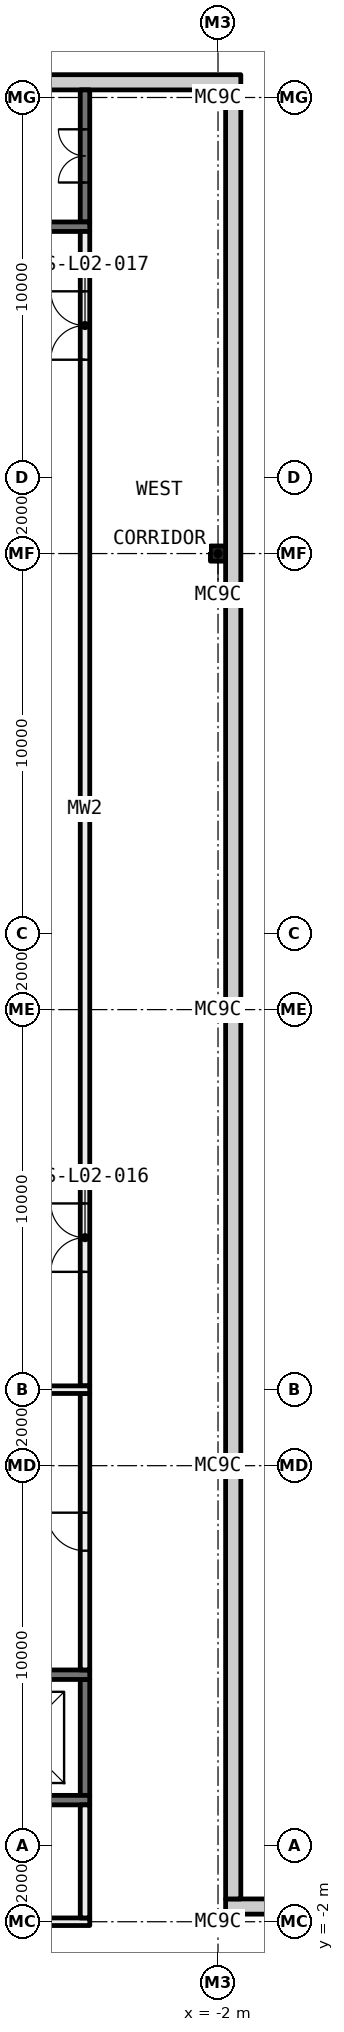
"""IFC4 building model, lengths in metres.
Left out: names, types, materials, properties, quantities, classifications, styles, units other than length and angle.
Written with IfcOpenShell. Run it as: python <this file> out.ifc"""

import sys

from ifc_helpers import new_model, si_unit, direction, frame, frame_2d, origin, origin_2d, place, context, subcontext, project, spatial, rectangle, i_section, extrude, element, fill, save


model = new_model("IFC4")
c1 = context("Model", 3, precision=1e-05, world=origin(), true_north=direction((0.0, 1.0)))
c2 = subcontext(c1, "Body", "Model", "MODEL_VIEW")
j1 = project(units=[si_unit("LENGTHUNIT", "METRE"), si_unit("PLANEANGLEUNIT", "RADIAN")], contexts=[c1])
p1 = place(None, origin())
s1 = spatial("IfcSite", under=j1, at=p1, CompositionType="ELEMENT")
p2 = place(p1, origin())
s2 = spatial("IfcBuilding", under=s1, at=p2, CompositionType="ELEMENT")
p3 = place(p2, frame((0.0, 0.0, 12.0)))
s3 = spatial("IfcBuildingStorey", under=s2, at=p3, CompositionType="ELEMENT", Elevation=12.0)
for number, where, z_axis, x_axis in (
    (1, (-2.0, -2.0, 0.0), (0.0, 0.0, 1.0), (1.0, 0.0, 0.0)),
    (2, (-2.0, 10.0, 0.0), (0.0, 0.0, 1.0), (1.0, 0.0, 0.0)),
    (3, (-2.0, 22.0, 0.0), (0.0, 0.0, 1.0), (1.0, 0.0, 0.0)),
    (4, (-2.0, 34.0, 0.0), (0.0, 0.0, 1.0), (1.0, 0.0, 0.0)),
    (5, (-2.0, 46.0, 0.0), (0.0, 0.0, 1.0), (1.0, 0.0, 0.0)),
):
    element("IfcColumn", number, at=place(p3, frame(where, z_axis=z_axis, x_axis=x_axis)), inside=s3, PredefinedType="COLUMN", context=c2, shape_type="SweptSolid", body=[
        extrude(i_section(OverallWidth=0.4, OverallDepth=0.4, WebThickness=0.013, FlangeThickness=0.021, FilletRadius=0.022, at=origin_2d()), origin(), (0.0, 0.0, 1.0), 5.6),
    ])
p4 = place(p3, frame((-5.5, 12.1, 0.0), z_axis=(0.0, 0.0, 1.0), x_axis=(0.0, 1.0, 0.0)))
e6 = element("IfcWall", 6, at=p4, inside=s3, PredefinedType="PARTITIONING", context=c2, shape_type="SweptSolid", body=[
    extrude(rectangle(XDim=30.375, YDim=0.25, at=frame_2d((15.188, 0.0))), origin(), (0.0, 0.0, 1.0), 5.6),
])
p5 = place(p4, frame((3.0, 0.0, 0.0)))
e7 = element("IfcOpeningElement", 7, at=p5, cuts=e6, PredefinedType="OPENING", context=c2, shape_type="SweptSolid", body=[
    extrude(rectangle(XDim=1.8, YDim=2.1, at=frame_2d((0.9, 1.05))), frame((0.0, 0.135, 0.0), z_axis=(0.0, -1.0, 0.0), x_axis=(1.0, 0.0, 0.0)), (0.0, 0.0, 1.0), 0.27),
])
p6 = place(p4, frame((27.0, 0.0, 0.0)))
e8 = element("IfcOpeningElement", 8, at=p6, cuts=e6, PredefinedType="OPENING", context=c2, shape_type="SweptSolid", body=[
    extrude(rectangle(XDim=1.8, YDim=2.1, at=frame_2d((0.9, 1.05))), frame((0.0, 0.135, 0.0), z_axis=(0.0, -1.0, 0.0), x_axis=(1.0, 0.0, 0.0)), (0.0, 0.0, 1.0), 0.27),
])
p7 = place(p3, frame((-12.375, -2.0, 0.0), z_axis=(0.0, 0.0, 1.0), x_axis=(1.0, 0.0, 0.0)))
e9 = element("IfcWall", 9, at=p7, inside=s3, PredefinedType="PARTITIONING", context=c2, shape_type="SweptSolid", body=[
    extrude(rectangle(XDim=7.0, YDim=0.2, at=frame_2d((3.5, 0.0))), origin(), (0.0, 0.0, 1.0), 5.012),
])
p8 = place(p7, frame((2.6, 0.0, 0.0)))
e10 = element("IfcOpeningElement", 10, at=p8, cuts=e9, PredefinedType="OPENING", context=c2, shape_type="SweptSolid", body=[
    extrude(rectangle(XDim=1.8, YDim=2.1, at=frame_2d((0.9, 1.05))), frame((0.0, 0.11, 0.0), z_axis=(0.0, -1.0, 0.0), x_axis=(1.0, 0.0, 0.0)), (0.0, 0.0, 1.0), 0.22),
])
p9 = place(p3, frame((-5.5, -1.9, 0.0), z_axis=(0.0, 0.0, 1.0), x_axis=(0.0, 1.0, 0.0)))
e11 = element("IfcWall", 11, at=p9, inside=s3, PredefinedType="PARTITIONING", context=c2, shape_type="SweptSolid", body=[
    extrude(rectangle(XDim=2.975, YDim=0.25, at=frame_2d((1.487, 0.0))), origin(), (0.0, 0.0, 1.0), 5.6),
])
p10 = place(p3, frame((-5.5, 1.325, 0.0), z_axis=(0.0, 0.0, 1.0), x_axis=(0.0, 1.0, 0.0)))
e12 = element("IfcWall", 12, at=p10, inside=s3, PredefinedType="SHEAR", context=c2, shape_type="SweptSolid", body=[
    extrude(rectangle(XDim=3.05, YDim=0.25, at=frame_2d((1.525, 0.0))), origin(), (0.0, 0.0, 1.0), 5.6),
])
p11 = place(p3, frame((-5.5, 42.725, 0.0), z_axis=(0.0, 0.0, 1.0), x_axis=(0.0, 1.0, 0.0)))
e13 = element("IfcWall", 13, at=p11, inside=s3, PredefinedType="SHEAR", context=c2, shape_type="SweptSolid", body=[
    extrude(rectangle(XDim=3.475, YDim=0.25, at=frame_2d((1.737, 0.0))), origin(), (0.0, 0.0, 1.0), 5.6),
])
p12 = place(p11, frame((1.038, 0.0, 0.0)))
e14 = element("IfcOpeningElement", 14, at=p12, cuts=e13, PredefinedType="OPENING", context=c2, shape_type="SweptSolid", body=[
    extrude(rectangle(XDim=1.4, YDim=2.1, at=frame_2d((0.7, 1.05))), frame((0.0, 0.135, 0.0), z_axis=(0.0, -1.0, 0.0), x_axis=(1.0, 0.0, 0.0)), (0.0, 0.0, 1.0), 0.27),
])
p13 = place(p3, frame((-5.5, 4.625, 0.0), z_axis=(0.0, 0.0, 1.0), x_axis=(0.0, 1.0, 0.0)))
e15 = element("IfcWall", 15, at=p13, inside=s3, PredefinedType="PARTITIONING", context=c2, shape_type="SweptSolid", body=[
    extrude(rectangle(XDim=7.275, YDim=0.25, at=frame_2d((3.637, 0.0))), origin(), (0.0, 0.0, 1.0), 5.6),
])
p14 = place(p13, frame((3.138, 0.0, 0.0)))
e16 = element("IfcOpeningElement", 16, at=p14, cuts=e15, PredefinedType="OPENING", context=c2, shape_type="SweptSolid", body=[
    extrude(rectangle(XDim=1.0, YDim=2.1, at=frame_2d((0.5, 1.05))), frame((0.0, 0.135, 0.0), z_axis=(0.0, -1.0, 0.0), x_axis=(1.0, 0.0, 0.0)), (0.0, 0.0, 1.0), 0.27),
])
p15 = place(p3, frame((-8.875, 1.2, 0.0), z_axis=(0.0, 0.0, 1.0), x_axis=(1.0, 0.0, 0.0)))
e17 = element("IfcWall", 17, at=p15, inside=s3, PredefinedType="SHEAR", context=c2, shape_type="SweptSolid", body=[
    extrude(rectangle(XDim=3.5, YDim=0.25, at=frame_2d((1.75, 0.0))), origin(), (0.0, 0.0, 1.0), 5.6),
])
p16 = place(p15, frame((1.075, 0.0, 0.0)))
e18 = element("IfcOpeningElement", 18, at=p16, cuts=e17, PredefinedType="OPENING", context=c2, shape_type="SweptSolid", body=[
    extrude(rectangle(XDim=1.1, YDim=2.1, at=frame_2d((0.55, 1.05))), frame((0.0, 0.135, 0.0), z_axis=(0.0, -1.0, 0.0), x_axis=(1.0, 0.0, 0.0)), (0.0, 0.0, 1.0), 0.27),
])
p17 = place(p3, frame((-8.0, 4.5, 0.0), z_axis=(0.0, 0.0, 1.0), x_axis=(1.0, 0.0, 0.0)))
e19 = element("IfcWall", 19, at=p17, inside=s3, PredefinedType="SHEAR", context=c2, shape_type="SweptSolid", body=[
    extrude(rectangle(XDim=2.625, YDim=0.25, at=frame_2d((1.312, 0.0))), origin(), (0.0, 0.0, 1.0), 5.6),
])
p18 = place(p3, frame((-15.125, 42.6, 0.0), z_axis=(0.0, 0.0, 1.0), x_axis=(1.0, 0.0, 0.0)))
e20 = element("IfcWall", 20, at=p18, inside=s3, PredefinedType="SHEAR", context=c2, shape_type="SweptSolid", body=[
    extrude(rectangle(XDim=9.75, YDim=0.25, at=frame_2d((4.875, 0.0))), origin(), (0.0, 0.0, 1.0), 5.6),
])
p19 = place(p3, frame((-7.8, 12.0, 0.0), z_axis=(0.0, 0.0, 1.0), x_axis=(1.0, 0.0, 0.0)))
e21 = element("IfcWall", 21, at=p19, inside=s3, PredefinedType="PARTITIONING", context=c2, shape_type="SweptSolid", body=[
    extrude(rectangle(XDim=2.425, YDim=0.2, at=frame_2d((1.212, 0.0))), origin(), (0.0, 0.0, 1.0), 5.6),
])
p20 = place(p3, frame((-1.8, -1.6, -0.4), z_axis=(0.0, 0.0, 1.0), x_axis=(1.0, 0.0, 0.0)))
e22 = element("IfcWall", 22, at=p20, inside=s3, PredefinedType="STANDARD", context=c2, shape_type="SweptSolid", body=[
    extrude(rectangle(XDim=12.4, YDim=0.4, at=frame_2d((6.2, 0.0))), origin(), (0.0, 0.0, 1.0), 6.0),
])
p21 = place(p3, frame((-1.6, -1.4, -0.4), z_axis=(0.0, 0.0, 1.0), x_axis=(0.0, 1.0, 0.0)))
e23 = element("IfcWall", 23, at=p21, inside=s3, PredefinedType="STANDARD", context=c2, shape_type="SweptSolid", body=[
    extrude(rectangle(XDim=47.6, YDim=0.4, at=frame_2d((23.8, 0.0))), origin(), (0.0, 0.0, 1.0), 6.0),
])
p22 = place(p3, frame((-26.6, 46.4, -0.4), z_axis=(0.0, 0.0, 1.0), x_axis=(1.0, 0.0, 0.0)))
e24 = element("IfcWall", 24, at=p22, inside=s3, PredefinedType="STANDARD", context=c2, shape_type="SweptSolid", body=[
    extrude(rectangle(XDim=25.2, YDim=0.4, at=frame_2d((12.6, 0.0))), origin(), (0.0, 0.0, 1.0), 6.0),
])
p23 = place(p12, origin())
e25 = element("IfcDoor", 25, at=p23, inside=s3, OperationType="DOUBLE_DOOR_SINGLE_SWING", PredefinedType="DOOR", context=c2, shape_type="SweptSolid", body=[
    extrude(rectangle(XDim=1.4, YDim=2.1, at=frame_2d((0.7, 1.05))), frame((0.0, 0.025, 0.0), z_axis=(0.0, -1.0, 0.0), x_axis=(1.0, 0.0, 0.0)), (0.0, 0.0, 1.0), 0.05),
])
fill(e14, e25)
p24 = place(p14, origin())
e26 = element("IfcDoor", 26, at=p24, inside=s3, OperationType="SINGLE_SWING_LEFT", PredefinedType="DOOR", context=c2, shape_type="SweptSolid", body=[
    extrude(rectangle(XDim=1.0, YDim=2.1, at=frame_2d((0.5, 1.05))), frame((0.0, 0.025, 0.0), z_axis=(0.0, -1.0, 0.0), x_axis=(1.0, 0.0, 0.0)), (0.0, 0.0, 1.0), 0.05),
])
fill(e16, e26)
p25 = place(p5, origin())
e27 = element("IfcDoor", 27, at=p25, inside=s3, OperationType="DOUBLE_DOOR_SINGLE_SWING", PredefinedType="DOOR", context=c2, shape_type="SweptSolid", body=[
    extrude(rectangle(XDim=1.8, YDim=2.1, at=frame_2d((0.9, 1.05))), frame((0.0, 0.025, 0.0), z_axis=(0.0, -1.0, 0.0), x_axis=(1.0, 0.0, 0.0)), (0.0, 0.0, 1.0), 0.05),
])
fill(e7, e27)
p26 = place(p6, origin())
e28 = element("IfcDoor", 28, at=p26, inside=s3, OperationType="DOUBLE_DOOR_SINGLE_SWING", PredefinedType="DOOR", context=c2, shape_type="SweptSolid", body=[
    extrude(rectangle(XDim=1.8, YDim=2.1, at=frame_2d((0.9, 1.05))), frame((0.0, 0.025, 0.0), z_axis=(0.0, -1.0, 0.0), x_axis=(1.0, 0.0, 0.0)), (0.0, 0.0, 1.0), 0.05),
])
fill(e8, e28)
save(model, sys.argv[1])
